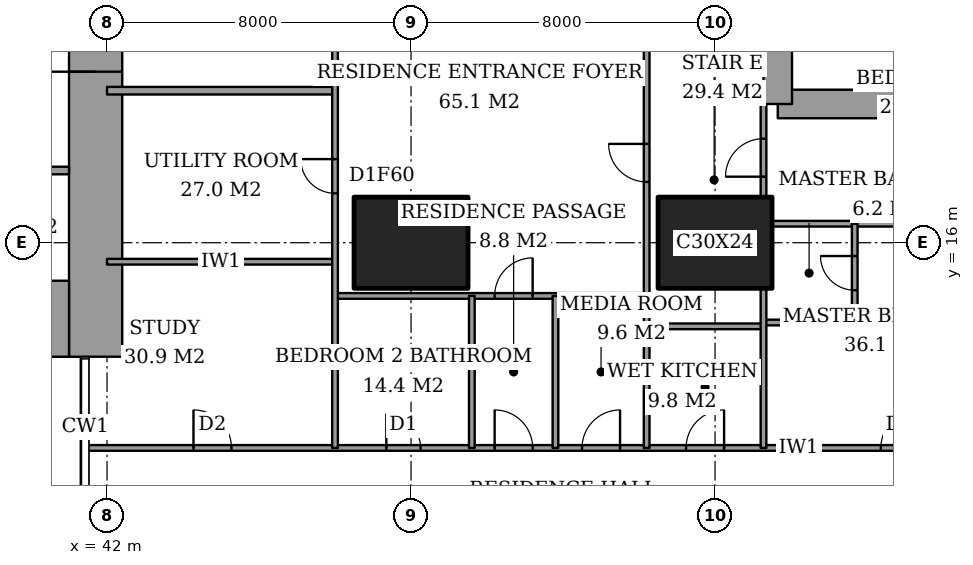
"""IFC4 building model, lengths in metres.
Left out: names, types, materials, properties, quantities, classifications, styles, units other than length and angle.
Written with IfcOpenShell. Run it as: python <this file> out.ifc"""

import sys

from ifc_helpers import new_model, si_unit, direction, frame, frame_2d, origin, origin_2d, place, context, subcontext, project, spatial, rectangle, extrude, element, fill, save


model = new_model("IFC4")
c1 = context("Model", 3, precision=1e-05, world=origin(), true_north=direction((0.0, 1.0)))
c2 = subcontext(c1, "Body", "Model", "MODEL_VIEW")
j1 = project(units=[si_unit("LENGTHUNIT", "METRE"), si_unit("PLANEANGLEUNIT", "RADIAN")], contexts=[c1])
p1 = place(None, origin())
s1 = spatial("IfcSite", under=j1, at=p1, CompositionType="ELEMENT")
p2 = place(p1, origin())
s2 = spatial("IfcBuilding", under=s1, at=p2, CompositionType="ELEMENT")
p3 = place(p2, frame((0.0, 0.0, 107.0)))
s3 = spatial("IfcBuildingStorey", under=s2, at=p3, CompositionType="ELEMENT", Elevation=107.0)
for number, where, z_axis, x_axis in (
    (1, (50.0, 16.0, 0.0), (0.0, 0.0, 1.0), (1.0, 0.0, 0.0)),
    (2, (58.0, 16.0, 0.0), (0.0, 0.0, 1.0), (1.0, 0.0, 0.0)),
):
    element("IfcColumn", number, at=place(p3, frame(where, z_axis=z_axis, x_axis=x_axis)), inside=s3, PredefinedType="COLUMN", context=c2, shape_type="SweptSolid", body=[
        extrude(rectangle(XDim=3.0, YDim=2.4, at=origin_2d()), origin(), (0.0, 0.0, 1.0), 3.6),
    ])
p4 = place(p3, frame((37.85, 14.0, 0.0), z_axis=(0.0, 0.0, 1.0), x_axis=(1.0, 0.0, 0.0)))
e3 = element("IfcWall", 3, at=p4, inside=s3, PredefinedType="SHEAR", context=c2, shape_type="SweptSolid", body=[
    extrude(rectangle(XDim=3.15, YDim=2.0, at=frame_2d((1.575, 0.0))), origin(), (0.0, 0.0, 1.0), 3.6),
])
p5 = place(p3, frame((41.7, 13.0, 0.0), z_axis=(0.0, 0.0, 1.0), x_axis=(0.0, 1.0, 0.0)))
e4 = element("IfcWall", 4, at=p5, inside=s3, PredefinedType="SHEAR", context=c2, shape_type="SweptSolid", body=[
    extrude(rectangle(XDim=11.85, YDim=1.4, at=frame_2d((5.925, 0.0))), origin(), (0.0, 0.0, 1.0), 3.6),
])
p6 = place(p5, frame((7.5, 0.0, 0.0)))
e5 = element("IfcOpeningElement", 5, at=p6, cuts=e4, PredefinedType="OPENING", context=c2, shape_type="SweptSolid", body=[
    extrude(rectangle(XDim=1.8, YDim=2.4, at=frame_2d((0.9, 1.2))), frame((0.0, 0.71, 0.0), z_axis=(0.0, -1.0, 0.0), x_axis=(1.0, 0.0, 0.0)), (0.0, 0.0, 1.0), 1.42),
])
p7 = place(p3, frame((59.65, 19.65, 0.0), z_axis=(0.0, 0.0, 1.0), x_axis=(1.0, 0.0, 0.0)))
e6 = element("IfcWall", 6, at=p7, inside=s3, PredefinedType="SHEAR", context=c2, shape_type="SweptSolid", body=[
    extrude(rectangle(XDim=4.45, YDim=0.75, at=frame_2d((2.225, 0.0))), origin(), (0.0, 0.0, 1.0), 3.6),
])
p8 = place(p3, frame((59.65, 28.35, 0.0), z_axis=(0.0, 0.0, 1.0), x_axis=(0.0, -1.0, 0.0)))
e7 = element("IfcWall", 7, at=p8, inside=s3, PredefinedType="SHEAR", context=c2, shape_type="SweptSolid", body=[
    extrude(rectangle(XDim=8.7, YDim=0.75, at=frame_2d((4.35, 0.0))), origin(), (0.0, 0.0, 1.0), 3.6),
])
p9 = place(p8, frame((0.975, 0.0, 0.0)))
e8 = element("IfcOpeningElement", 8, at=p9, cuts=e7, PredefinedType="OPENING", context=c2, shape_type="SweptSolid", body=[
    extrude(rectangle(XDim=1.0, YDim=2.1, at=frame_2d((0.5, 1.05))), frame((0.0, 0.385, 0.0), z_axis=(0.0, -1.0, 0.0), x_axis=(1.0, 0.0, 0.0)), (0.0, 0.0, 1.0), 0.77),
])
p10 = place(p3, frame((41.439, 10.6, 0.0), z_axis=(0.0, 0.0, 1.0), x_axis=(1.0, 0.0, 0.0)))
e9 = element("IfcWall", 9, at=p10, inside=s3, PredefinedType="PARTITIONING", context=c2, shape_type="SweptSolid", body=[
    extrude(rectangle(XDim=25.011, YDim=0.15, at=frame_2d((12.505, 0.0))), origin(), (0.0, 0.0, 1.0), 3.35),
])
p11 = place(p10, frame((10.761, 0.0, 0.0)))
e10 = element("IfcOpeningElement", 10, at=p11, cuts=e9, PredefinedType="OPENING", context=c2, shape_type="SweptSolid", body=[
    extrude(rectangle(XDim=1.0, YDim=2.1, at=frame_2d((0.5, 1.05))), frame((0.0, 0.085, 0.0), z_axis=(0.0, -1.0, 0.0), x_axis=(1.0, 0.0, 0.0)), (0.0, 0.0, 1.0), 0.17),
])
p12 = place(p10, frame((20.924, 0.0, 0.0)))
e11 = element("IfcOpeningElement", 11, at=p12, cuts=e9, PredefinedType="OPENING", context=c2, shape_type="SweptSolid", body=[
    extrude(rectangle(XDim=1.0, YDim=2.1, at=frame_2d((0.5, 1.05))), frame((0.0, 0.085, 0.0), z_axis=(0.0, -1.0, 0.0), x_axis=(1.0, 0.0, 0.0)), (0.0, 0.0, 1.0), 0.17),
])
p13 = place(p10, frame((15.799, 0.0, 0.0)))
e12 = element("IfcOpeningElement", 12, at=p13, cuts=e9, PredefinedType="OPENING", context=c2, shape_type="SweptSolid", body=[
    extrude(rectangle(XDim=1.0, YDim=2.1, at=frame_2d((0.5, 1.05))), frame((0.0, 0.085, 0.0), z_axis=(0.0, -1.0, 0.0), x_axis=(1.0, 0.0, 0.0)), (0.0, 0.0, 1.0), 0.17),
])
p14 = place(p10, frame((13.061, 0.0, 0.0)))
e13 = element("IfcOpeningElement", 13, at=p14, cuts=e9, PredefinedType="OPENING", context=c2, shape_type="SweptSolid", body=[
    extrude(rectangle(XDim=1.0, YDim=2.1, at=frame_2d((0.5, 1.05))), frame((0.0, 0.085, 0.0), z_axis=(0.0, -1.0, 0.0), x_axis=(1.0, 0.0, 0.0)), (0.0, 0.0, 1.0), 0.17),
])
p15 = place(p10, frame((7.911, 0.0, 0.0)))
e14 = element("IfcOpeningElement", 14, at=p15, cuts=e9, PredefinedType="OPENING", context=c2, shape_type="SweptSolid", body=[
    extrude(rectangle(XDim=0.9, YDim=2.1, at=frame_2d((0.45, 1.05))), frame((0.0, 0.085, 0.0), z_axis=(0.0, -1.0, 0.0), x_axis=(1.0, 0.0, 0.0)), (0.0, 0.0, 1.0), 0.17),
])
p16 = place(p10, frame((2.836, 0.0, 0.0)))
e15 = element("IfcOpeningElement", 15, at=p16, cuts=e9, PredefinedType="OPENING", context=c2, shape_type="SweptSolid", body=[
    extrude(rectangle(XDim=1.0, YDim=2.1, at=frame_2d((0.5, 1.05))), frame((0.0, 0.085, 0.0), z_axis=(0.0, -1.0, 0.0), x_axis=(1.0, 0.0, 0.0)), (0.0, 0.0, 1.0), 0.17),
])
p17 = place(p3, frame((56.2, 13.8, 0.0), z_axis=(0.0, 0.0, 1.0), x_axis=(1.0, 0.0, 0.0)))
e16 = element("IfcWall", 16, at=p17, inside=s3, PredefinedType="PARTITIONING", context=c2, shape_type="SweptSolid", body=[
    extrude(rectangle(XDim=3.075, YDim=0.15, at=frame_2d((1.538, 0.0))), origin(), (0.0, 0.0, 1.0), 3.35),
])
p18 = place(p3, frame((59.275, 13.9, 0.0), z_axis=(0.0, 0.0, 1.0), x_axis=(1.0, 0.0, 0.0)))
e17 = element("IfcWall", 17, at=p18, inside=s3, PredefinedType="PARTITIONING", context=c2, shape_type="SweptSolid", body=[
    extrude(rectangle(XDim=2.4, YDim=0.15, at=frame_2d((1.2, 0.0))), origin(), (0.0, 0.0, 1.0), 3.35),
])
p19 = place(p3, frame((48.0, 14.6, 0.0), z_axis=(0.0, 0.0, 1.0), x_axis=(1.0, 0.0, 0.0)))
e18 = element("IfcWall", 18, at=p19, inside=s3, PredefinedType="PARTITIONING", context=c2, shape_type="SweptSolid", body=[
    extrude(rectangle(XDim=8.2, YDim=0.15, at=frame_2d((4.1, 0.0))), origin(), (0.0, 0.0, 1.0), 3.35),
])
p20 = place(p19, frame((4.2, 0.0, 0.0)))
e19 = element("IfcOpeningElement", 19, at=p20, cuts=e18, PredefinedType="OPENING", context=c2, shape_type="SweptSolid", body=[
    extrude(rectangle(XDim=1.0, YDim=2.1, at=frame_2d((0.5, 1.05))), frame((0.0, 0.085, 0.0), z_axis=(0.0, -1.0, 0.0), x_axis=(1.0, 0.0, 0.0)), (0.0, 0.0, 1.0), 0.17),
])
p21 = place(p3, frame((42.0, 15.5, 0.0), z_axis=(0.0, 0.0, 1.0), x_axis=(1.0, 0.0, 0.0)))
e20 = element("IfcWall", 20, at=p21, inside=s3, PredefinedType="PARTITIONING", context=c2, shape_type="SweptSolid", body=[
    extrude(rectangle(XDim=6.0, YDim=0.15, at=frame_2d((3.0, 0.0))), origin(), (0.0, 0.0, 1.0), 3.35),
])
p22 = place(p3, frame((59.5, 16.5, 0.0), z_axis=(0.0, 0.0, 1.0), x_axis=(1.0, 0.0, 0.0)))
e21 = element("IfcWall", 21, at=p22, inside=s3, PredefinedType="PARTITIONING", context=c2, shape_type="SweptSolid", body=[
    extrude(rectangle(XDim=5.15, YDim=0.15, at=frame_2d((2.575, 0.0))), origin(), (0.0, 0.0, 1.0), 3.35),
])
p23 = place(p3, frame((42.0, 20.0, 0.0), z_axis=(0.0, 0.0, 1.0), x_axis=(1.0, 0.0, 0.0)))
e22 = element("IfcWall", 22, at=p23, inside=s3, PredefinedType="PARTITIONING", context=c2, shape_type="SweptSolid", body=[
    extrude(rectangle(XDim=6.0, YDim=0.2, at=frame_2d((3.0, 0.0))), origin(), (0.0, 0.0, 1.0), 3.35),
])
p24 = place(p3, frame((48.0, 10.6, 0.0), z_axis=(0.0, 0.0, 1.0), x_axis=(0.0, 1.0, 0.0)))
e23 = element("IfcWall", 23, at=p24, inside=s3, PredefinedType="PARTITIONING", context=c2, shape_type="SweptSolid", body=[
    extrude(rectangle(XDim=13.4, YDim=0.15, at=frame_2d((6.7, 0.0))), origin(), (0.0, 0.0, 1.0), 3.35),
])
p25 = place(p24, frame((10.8, 0.0, 0.0)))
e24 = element("IfcOpeningElement", 24, at=p25, cuts=e23, PredefinedType="OPENING", context=c2, shape_type="SweptSolid", body=[
    extrude(rectangle(XDim=1.2, YDim=2.4, at=frame_2d((0.6, 1.2))), frame((0.0, 0.085, 0.0), z_axis=(0.0, -1.0, 0.0), x_axis=(1.0, 0.0, 0.0)), (0.0, 0.0, 1.0), 0.17),
])
p26 = place(p24, frame((6.7, 0.0, 0.0)))
e25 = element("IfcOpeningElement", 25, at=p26, cuts=e23, PredefinedType="OPENING", context=c2, shape_type="SweptSolid", body=[
    extrude(rectangle(XDim=0.9, YDim=2.1, at=frame_2d((0.45, 1.05))), frame((0.0, 0.085, 0.0), z_axis=(0.0, -1.0, 0.0), x_axis=(1.0, 0.0, 0.0)), (0.0, 0.0, 1.0), 0.17),
])
for number, where, z_axis, x_axis in (
    (26, (51.6, 10.6, 0.0), (0.0, 0.0, 1.0), (0.0, 1.0, 0.0)),
    (27, (53.8, 10.6, 0.0), (0.0, 0.0, 1.0), (0.0, 1.0, 0.0)),
):
    element("IfcWall", number, at=place(p3, frame(where, z_axis=z_axis, x_axis=x_axis)), inside=s3, PredefinedType="PARTITIONING", context=c2, shape_type="SweptSolid", body=[
        extrude(rectangle(XDim=4.0, YDim=0.15, at=frame_2d((2.0, 0.0))), origin(), (0.0, 0.0, 1.0), 3.35),
    ])
p27 = place(p3, frame((56.2, 10.6, 0.0), z_axis=(0.0, 0.0, 1.0), x_axis=(0.0, 1.0, 0.0)))
e28 = element("IfcWall", 28, at=p27, inside=s3, PredefinedType="PARTITIONING", context=c2, shape_type="SweptSolid", body=[
    extrude(rectangle(XDim=11.0, YDim=0.15, at=frame_2d((5.5, 0.0))), origin(), (0.0, 0.0, 1.0), 3.35),
])
p28 = place(p27, frame((7.0, 0.0, 0.0)))
e29 = element("IfcOpeningElement", 29, at=p28, cuts=e28, PredefinedType="OPENING", context=c2, shape_type="SweptSolid", body=[
    extrude(rectangle(XDim=1.0, YDim=2.1, at=frame_2d((0.5, 1.05))), frame((0.0, 0.085, 0.0), z_axis=(0.0, -1.0, 0.0), x_axis=(1.0, 0.0, 0.0)), (0.0, 0.0, 1.0), 0.17),
])
p29 = place(p3, frame((59.275, 10.6, 0.0), z_axis=(0.0, 0.0, 1.0), x_axis=(0.0, 1.0, 0.0)))
e30 = element("IfcWall", 30, at=p29, inside=s3, PredefinedType="PARTITIONING", context=c2, shape_type="SweptSolid", body=[
    extrude(rectangle(XDim=4.2, YDim=0.15, at=frame_2d((2.1, 0.0))), origin(), (0.0, 0.0, 1.0), 3.35),
])
p30 = place(p3, frame((59.275, 17.2, 0.0), z_axis=(0.0, 0.0, 1.0), x_axis=(0.0, 1.0, 0.0)))
e31 = element("IfcWall", 31, at=p30, inside=s3, PredefinedType="PARTITIONING", context=c2, shape_type="SweptSolid", body=[
    extrude(rectangle(XDim=2.45, YDim=0.15, at=frame_2d((1.225, 0.0))), origin(), (0.0, 0.0, 1.0), 3.35),
])
p31 = place(p30, frame((0.538, 0.0, 0.0)))
e32 = element("IfcOpeningElement", 32, at=p31, cuts=e31, PredefinedType="OPENING", context=c2, shape_type="SweptSolid", body=[
    extrude(rectangle(XDim=1.0, YDim=2.1, at=frame_2d((0.5, 1.05))), frame((0.0, 0.085, 0.0), z_axis=(0.0, -1.0, 0.0), x_axis=(1.0, 0.0, 0.0)), (0.0, 0.0, 1.0), 0.17),
])
p32 = place(p3, frame((61.675, 13.9, 0.0), z_axis=(0.0, 0.0, 1.0), x_axis=(0.0, 1.0, 0.0)))
e33 = element("IfcWall", 33, at=p32, inside=s3, PredefinedType="PARTITIONING", context=c2, shape_type="SweptSolid", body=[
    extrude(rectangle(XDim=2.6, YDim=0.15, at=frame_2d((1.3, 0.0))), origin(), (0.0, 0.0, 1.0), 3.35),
])
p33 = place(p32, frame((0.85, 0.0, 0.0)))
e34 = element("IfcOpeningElement", 34, at=p33, cuts=e33, PredefinedType="OPENING", context=c2, shape_type="SweptSolid", body=[
    extrude(rectangle(XDim=0.9, YDim=2.1, at=frame_2d((0.45, 1.05))), frame((0.0, 0.085, 0.0), z_axis=(0.0, -1.0, 0.0), x_axis=(1.0, 0.0, 0.0)), (0.0, 0.0, 1.0), 0.17),
])
p34 = place(p3, frame((28.3, 17.9, 0.0), z_axis=(0.0, 0.0, 1.0), x_axis=(1.0, 0.0, 0.0)))
e35 = element("IfcWall", 35, at=p34, inside=s3, PredefinedType="PARTITIONING", context=c2, shape_type="SweptSolid", body=[
    extrude(rectangle(XDim=12.7, YDim=0.2, at=frame_2d((6.35, 0.0))), origin(), (0.0, 0.0, 1.0), 3.6),
])
p35 = place(p34, frame((0.95, 0.0, 0.0)))
e36 = element("IfcOpeningElement", 36, at=p35, cuts=e35, PredefinedType="OPENING", context=c2, shape_type="SweptSolid", body=[
    extrude(rectangle(XDim=1.1, YDim=2.1, at=frame_2d((0.55, 1.05))), frame((0.0, 0.11, 0.0), z_axis=(0.0, -1.0, 0.0), x_axis=(1.0, 0.0, 0.0)), (0.0, 0.0, 1.0), 0.22),
])
p36 = place(p34, frame((4.15, 0.0, 0.0)))
e37 = element("IfcOpeningElement", 37, at=p36, cuts=e35, PredefinedType="OPENING", context=c2, shape_type="SweptSolid", body=[
    extrude(rectangle(XDim=1.1, YDim=2.1, at=frame_2d((0.55, 1.05))), frame((0.0, 0.11, 0.0), z_axis=(0.0, -1.0, 0.0), x_axis=(1.0, 0.0, 0.0)), (0.0, 0.0, 1.0), 0.22),
])
p37 = place(p34, frame((7.35, 0.0, 0.0)))
e38 = element("IfcOpeningElement", 38, at=p37, cuts=e35, PredefinedType="OPENING", context=c2, shape_type="SweptSolid", body=[
    extrude(rectangle(XDim=1.1, YDim=2.1, at=frame_2d((0.55, 1.05))), frame((0.0, 0.11, 0.0), z_axis=(0.0, -1.0, 0.0), x_axis=(1.0, 0.0, 0.0)), (0.0, 0.0, 1.0), 0.22),
])
p38 = place(p34, frame((10.6, 0.0, 0.0)))
e39 = element("IfcOpeningElement", 39, at=p38, cuts=e35, PredefinedType="OPENING", context=c2, shape_type="SweptSolid", body=[
    extrude(rectangle(XDim=1.2, YDim=2.1, at=frame_2d((0.6, 1.05))), frame((0.0, 0.11, 0.0), z_axis=(0.0, -1.0, 0.0), x_axis=(1.0, 0.0, 0.0)), (0.0, 0.0, 1.0), 0.22),
])
p39 = place(p11, origin())
e40 = element("IfcDoor", 40, at=p39, inside=s3, OperationType="SINGLE_SWING_RIGHT", PredefinedType="DOOR", context=c2, shape_type="SweptSolid", body=[
    extrude(rectangle(XDim=1.0, YDim=2.1, at=frame_2d((0.5, 1.05))), frame((0.0, 0.025, 0.0), z_axis=(0.0, -1.0, 0.0), x_axis=(1.0, 0.0, 0.0)), (0.0, 0.0, 1.0), 0.05),
])
fill(e10, e40)
p40 = place(p33, origin())
e41 = element("IfcDoor", 41, at=p40, inside=s3, OperationType="SINGLE_SWING_LEFT", PredefinedType="DOOR", context=c2, shape_type="SweptSolid", body=[
    extrude(rectangle(XDim=0.9, YDim=2.1, at=frame_2d((0.45, 1.05))), frame((0.0, 0.025, 0.0), z_axis=(0.0, -1.0, 0.0), x_axis=(1.0, 0.0, 0.0)), (0.0, 0.0, 1.0), 0.05),
])
fill(e34, e41)
p41 = place(p12, origin())
e42 = element("IfcDoor", 42, at=p41, inside=s3, OperationType="SINGLE_SWING_LEFT", PredefinedType="DOOR", context=c2, shape_type="SweptSolid", body=[
    extrude(rectangle(XDim=1.0, YDim=2.1, at=frame_2d((0.5, 1.05))), frame((0.0, 0.025, 0.0), z_axis=(0.0, -1.0, 0.0), x_axis=(1.0, 0.0, 0.0)), (0.0, 0.0, 1.0), 0.05),
])
fill(e11, e42)
p42 = place(p31, origin())
e43 = element("IfcDoor", 43, at=p42, inside=s3, OperationType="SINGLE_SWING_RIGHT", PredefinedType="DOOR", context=c2, shape_type="SweptSolid", body=[
    extrude(rectangle(XDim=1.0, YDim=2.1, at=frame_2d((0.5, 1.05))), frame((0.0, 0.025, 0.0), z_axis=(0.0, -1.0, 0.0), x_axis=(1.0, 0.0, 0.0)), (0.0, 0.0, 1.0), 0.05),
])
fill(e32, e43)
p43 = place(p13, origin())
e44 = element("IfcDoor", 44, at=p43, inside=s3, OperationType="SINGLE_SWING_LEFT", PredefinedType="DOOR", context=c2, shape_type="SweptSolid", body=[
    extrude(rectangle(XDim=1.0, YDim=2.1, at=frame_2d((0.5, 1.05))), frame((0.0, 0.025, 0.0), z_axis=(0.0, -1.0, 0.0), x_axis=(1.0, 0.0, 0.0)), (0.0, 0.0, 1.0), 0.05),
])
fill(e12, e44)
p44 = place(p28, origin())
e45 = element("IfcDoor", 45, at=p44, inside=s3, OperationType="SINGLE_SWING_LEFT", PredefinedType="DOOR", context=c2, shape_type="SweptSolid", body=[
    extrude(rectangle(XDim=1.0, YDim=2.1, at=frame_2d((0.5, 1.05))), frame((0.0, 0.025, 0.0), z_axis=(0.0, -1.0, 0.0), x_axis=(1.0, 0.0, 0.0)), (0.0, 0.0, 1.0), 0.05),
])
fill(e29, e45)
p45 = place(p14, origin())
e46 = element("IfcDoor", 46, at=p45, inside=s3, OperationType="SINGLE_SWING_LEFT", PredefinedType="DOOR", context=c2, shape_type="SweptSolid", body=[
    extrude(rectangle(XDim=1.0, YDim=2.1, at=frame_2d((0.5, 1.05))), frame((0.0, 0.025, 0.0), z_axis=(0.0, -1.0, 0.0), x_axis=(1.0, 0.0, 0.0)), (0.0, 0.0, 1.0), 0.05),
])
fill(e13, e46)
p46 = place(p20, origin())
e47 = element("IfcDoor", 47, at=p46, inside=s3, OperationType="SINGLE_SWING_LEFT", PredefinedType="DOOR", context=c2, shape_type="SweptSolid", body=[
    extrude(rectangle(XDim=1.0, YDim=2.1, at=frame_2d((0.5, 1.05))), frame((0.0, 0.025, 0.0), z_axis=(0.0, -1.0, 0.0), x_axis=(1.0, 0.0, 0.0)), (0.0, 0.0, 1.0), 0.05),
])
fill(e19, e47)
p47 = place(p15, origin())
e48 = element("IfcDoor", 48, at=p47, inside=s3, OperationType="SINGLE_SWING_RIGHT", PredefinedType="DOOR", context=c2, shape_type="SweptSolid", body=[
    extrude(rectangle(XDim=0.9, YDim=2.1, at=frame_2d((0.45, 1.05))), frame((0.0, 0.025, 0.0), z_axis=(0.0, -1.0, 0.0), x_axis=(1.0, 0.0, 0.0)), (0.0, 0.0, 1.0), 0.05),
])
fill(e14, e48)
p48 = place(p16, origin())
e49 = element("IfcDoor", 49, at=p48, inside=s3, OperationType="SINGLE_SWING_RIGHT", PredefinedType="DOOR", context=c2, shape_type="SweptSolid", body=[
    extrude(rectangle(XDim=1.0, YDim=2.1, at=frame_2d((0.5, 1.05))), frame((0.0, 0.025, 0.0), z_axis=(0.0, -1.0, 0.0), x_axis=(1.0, 0.0, 0.0)), (0.0, 0.0, 1.0), 0.05),
])
fill(e15, e49)
p49 = place(p26, origin())
e50 = element("IfcDoor", 50, at=p49, inside=s3, OperationType="SINGLE_SWING_LEFT", PredefinedType="DOOR", context=c2, shape_type="SweptSolid", body=[
    extrude(rectangle(XDim=0.9, YDim=2.1, at=frame_2d((0.45, 1.05))), frame((0.0, 0.025, 0.0), z_axis=(0.0, -1.0, 0.0), x_axis=(1.0, 0.0, 0.0)), (0.0, 0.0, 1.0), 0.05),
])
fill(e25, e50)
p50 = place(p6, origin())
e51 = element("IfcDoor", 51, at=p50, inside=s3, OperationType="DOUBLE_DOOR_DOUBLE_SWING", PredefinedType="DOOR", context=c2, shape_type="SweptSolid", body=[
    extrude(rectangle(XDim=1.8, YDim=2.4, at=frame_2d((0.9, 1.2))), frame((0.0, 0.025, 0.0), z_axis=(0.0, -1.0, 0.0), x_axis=(1.0, 0.0, 0.0)), (0.0, 0.0, 1.0), 0.05),
])
fill(e5, e51)
save(model, sys.argv[1])
